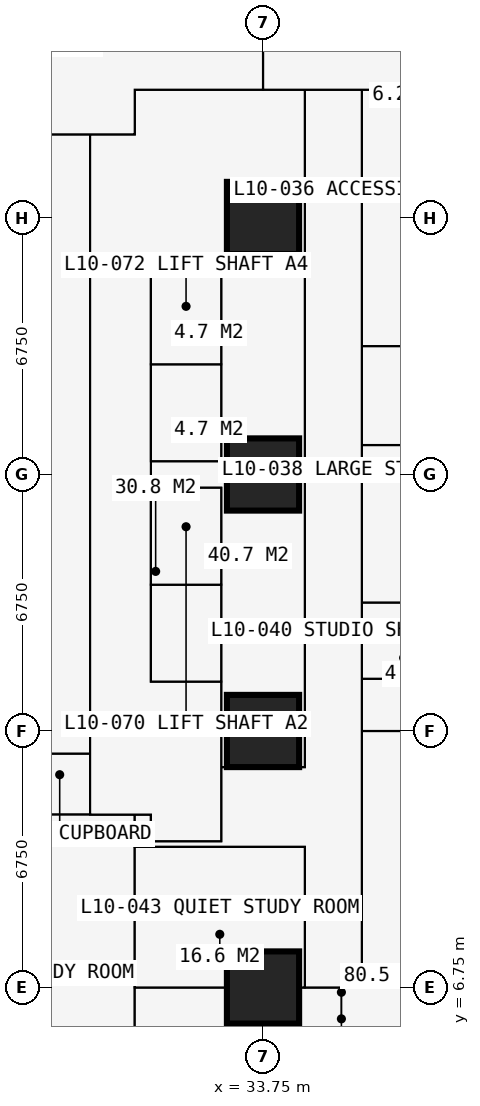
"""IFC4 building model, lengths in metres.
Left out: names, types, materials, properties, quantities, classifications, styles, units other than length and angle.
Written with IfcOpenShell. Run it as: python <this file> out.ifc"""

import sys

from ifc_helpers import new_model, si_unit, direction, frame, frame_2d, origin, origin_2d, place, context, subcontext, project, spatial, rectangle, extrude, element, fill, save


model = new_model("IFC4")
c1 = context("Model", 3, precision=1e-05, world=origin(), true_north=direction((0.0, 1.0)))
c2 = subcontext(c1, "Body", "Model", "MODEL_VIEW")
j1 = project(units=[si_unit("LENGTHUNIT", "METRE"), si_unit("PLANEANGLEUNIT", "RADIAN")], contexts=[c1])
p1 = place(None, origin())
s1 = spatial("IfcSite", under=j1, at=p1, CompositionType="ELEMENT")
p2 = place(p1, origin())
s2 = spatial("IfcBuilding", under=s1, at=p2, CompositionType="ELEMENT")
p3 = place(p2, frame((0.0, 0.0, 39.6)))
s3 = spatial("IfcBuildingStorey", under=s2, at=p3, CompositionType="ELEMENT", Elevation=39.6)
for number, where, z_axis, x_axis in (
    (1, (33.75, 6.75, 0.0), (0.0, 0.0, 1.0), (1.0, 0.0, 0.0)),
    (2, (33.75, 13.5, 0.0), (0.0, 0.0, 1.0), (1.0, 0.0, 0.0)),
    (3, (33.75, 20.25, 0.0), (0.0, 0.0, 1.0), (1.0, 0.0, 0.0)),
    (4, (33.75, 27.0, 0.0), (0.0, 0.0, 1.0), (1.0, 0.0, 0.0)),
):
    element("IfcColumn", number, at=place(p3, frame(where, z_axis=z_axis, x_axis=x_axis)), inside=s3, PredefinedType="COLUMN", context=c2, shape_type="SweptSolid", body=[
        extrude(rectangle(XDim=1.9, YDim=1.9, at=origin_2d()), origin(), (0.0, 0.0, 1.0), 3.6),
    ])
p4 = place(p3, frame((10.125, 11.3, 0.0), z_axis=(0.0, 0.0, 1.0), x_axis=(1.0, 0.0, 0.0)))
e5 = element("IfcWall", 5, at=p4, inside=s3, PredefinedType="PARTITIONING", context=c2, shape_type="SweptSolid", body=[
    extrude(rectangle(XDim=20.675, YDim=0.15, at=frame_2d((10.337, 0.0))), origin(), (0.0, 0.0, 1.0), 3.375),
])
p5 = place(p4, frame((8.375, 0.0, 0.0)))
e6 = element("IfcOpeningElement", 6, at=p5, cuts=e5, PredefinedType="OPENING", context=c2, shape_type="SweptSolid", body=[
    extrude(rectangle(XDim=1.0, YDim=2.2, at=frame_2d((0.5, 1.1))), frame((0.0, 0.085, 0.0), z_axis=(0.0, -1.0, 0.0), x_axis=(1.0, 0.0, 0.0)), (0.0, 0.0, 1.0), 0.17),
])
p6 = place(p4, frame((10.975, 0.0, 0.0)))
e7 = element("IfcOpeningElement", 7, at=p6, cuts=e5, PredefinedType="OPENING", context=c2, shape_type="SweptSolid", body=[
    extrude(rectangle(XDim=1.0, YDim=2.2, at=frame_2d((0.5, 1.1))), frame((0.0, 0.085, 0.0), z_axis=(0.0, -1.0, 0.0), x_axis=(1.0, 0.0, 0.0)), (0.0, 0.0, 1.0), 0.17),
])
p7 = place(p4, frame((3.925, 0.0, 0.0)))
e8 = element("IfcOpeningElement", 8, at=p7, cuts=e5, PredefinedType="OPENING", context=c2, shape_type="SweptSolid", body=[
    extrude(rectangle(XDim=0.95, YDim=2.2, at=frame_2d((0.475, 1.1))), frame((0.0, 0.085, 0.0), z_axis=(0.0, -1.0, 0.0), x_axis=(1.0, 0.0, 0.0)), (0.0, 0.0, 1.0), 0.17),
])
p8 = place(p3, frame((11.3, 29.2, 0.0), z_axis=(0.0, 0.0, 1.0), x_axis=(1.0, 0.0, 0.0)))
e9 = element("IfcWall", 9, at=p8, inside=s3, PredefinedType="PARTITIONING", context=c2, shape_type="SweptSolid", body=[
    extrude(rectangle(XDim=19.075, YDim=0.15, at=frame_2d((9.538, 0.0))), origin(), (0.0, 0.0, 1.0), 3.375),
])
p9 = place(p8, frame((10.137, 0.0, 0.0)))
e10 = element("IfcOpeningElement", 10, at=p9, cuts=e9, PredefinedType="OPENING", context=c2, shape_type="SweptSolid", body=[
    extrude(rectangle(XDim=1.0, YDim=2.2, at=frame_2d((0.5, 1.1))), frame((0.0, 0.085, 0.0), z_axis=(0.0, -1.0, 0.0), x_axis=(1.0, 0.0, 0.0)), (0.0, 0.0, 1.0), 0.17),
])
p10 = place(p3, frame((27.6, 12.9, 0.0), z_axis=(0.0, 0.0, 1.0), x_axis=(1.0, 0.0, 0.0)))
e11 = element("IfcWall", 11, at=p10, inside=s3, PredefinedType="PARTITIONING", context=c2, shape_type="SweptSolid", body=[
    extrude(rectangle(XDim=1.6, YDim=0.15, at=frame_2d((0.8, 0.0))), origin(), (0.0, 0.0, 1.0), 2.877),
])
p11 = place(p3, frame((29.2, 11.3, 0.0), z_axis=(0.0, 0.0, 1.0), x_axis=(0.0, 1.0, 0.0)))
e12 = element("IfcWall", 12, at=p11, inside=s3, PredefinedType="PARTITIONING", context=c2, shape_type="SweptSolid", body=[
    extrude(rectangle(XDim=17.9, YDim=0.2, at=frame_2d((8.95, 0.0))), origin(), (0.0, 0.0, 1.0), 3.375),
])
p12 = place(p11, frame((8.35, 0.0, 0.0)))
e13 = element("IfcOpeningElement", 13, at=p12, cuts=e12, PredefinedType="OPENING", context=c2, shape_type="SweptSolid", body=[
    extrude(rectangle(XDim=1.2, YDim=2.2, at=frame_2d((0.6, 1.1))), frame((0.0, 0.11, 0.0), z_axis=(0.0, -1.0, 0.0), x_axis=(1.0, 0.0, 0.0)), (0.0, 0.0, 1.0), 0.22),
])
p13 = place(p3, frame((29.2, 25.7, 0.0), z_axis=(0.0, 0.0, 1.0), x_axis=(1.0, 0.0, 0.0)))
e14 = element("IfcWall", 14, at=p13, inside=s3, PredefinedType="SHEAR", context=c2, shape_type="SweptSolid", body=[
    extrude(rectangle(XDim=3.45, YDim=0.1, at=frame_2d((1.725, 0.0))), origin(), (0.0, 0.0, 1.0), 3.375),
])
p14 = place(p3, frame((30.375, -0.734, 0.0), z_axis=(0.0, 0.0, 1.0), x_axis=(0.0, 1.0, 0.0)))
e15 = element("IfcWall", 15, at=p14, inside=s3, PredefinedType="PARTITIONING", context=c2, shape_type="SweptSolid", body=[
    extrude(rectangle(XDim=12.034, YDim=0.15, at=frame_2d((6.017, 0.0))), origin(), (0.0, 0.0, 1.0), 3.375),
])
p15 = place(p14, frame((5.134, 0.0, 0.0)))
e16 = element("IfcOpeningElement", 16, at=p15, cuts=e15, PredefinedType="OPENING", context=c2, shape_type="SweptSolid", body=[
    extrude(rectangle(XDim=1.0, YDim=2.2, at=frame_2d((0.5, 1.1))), frame((0.0, 0.085, 0.0), z_axis=(0.0, -1.0, 0.0), x_axis=(1.0, 0.0, 0.0)), (0.0, 0.0, 1.0), 0.17),
])
p16 = place(p3, frame((30.375, 6.75, 0.0), z_axis=(0.0, 0.0, 1.0), x_axis=(1.0, 0.0, 0.0)))
e17 = element("IfcWall", 17, at=p16, inside=s3, PredefinedType="PARTITIONING", context=c2, shape_type="SweptSolid", body=[
    extrude(rectangle(XDim=5.975, YDim=0.15, at=frame_2d((2.988, 0.0))), origin(), (0.0, 0.0, 1.0), 2.877),
])
p17 = place(p3, frame((30.375, 10.45, 0.0), z_axis=(0.0, 0.0, 1.0), x_axis=(1.0, 0.0, 0.0)))
e18 = element("IfcWall", 18, at=p17, inside=s3, PredefinedType="PARTITIONING", context=c2, shape_type="SweptSolid", body=[
    extrude(rectangle(XDim=4.475, YDim=0.15, at=frame_2d((2.238, 0.0))), origin(), (0.0, 0.0, 1.0), 3.375),
])
p18 = place(p17, frame((2.35, 0.0, 0.0)))
e19 = element("IfcOpeningElement", 19, at=p18, cuts=e18, PredefinedType="OPENING", context=c2, shape_type="SweptSolid", body=[
    extrude(rectangle(XDim=0.95, YDim=2.2, at=frame_2d((0.475, 1.1))), frame((0.0, 0.085, 0.0), z_axis=(0.0, -1.0, 0.0), x_axis=(1.0, 0.0, 0.0)), (0.0, 0.0, 1.0), 0.17),
])
p19 = place(p3, frame((30.375, 29.2, 0.0), z_axis=(0.0, 0.0, 1.0), x_axis=(0.0, 1.0, 0.0)))
e20 = element("IfcWall", 20, at=p19, inside=s3, PredefinedType="PARTITIONING", context=c2, shape_type="SweptSolid", body=[
    extrude(rectangle(XDim=1.175, YDim=0.15, at=frame_2d((0.587, 0.0))), origin(), (0.0, 0.0, 1.0), 3.375),
])
p20 = place(p3, frame((30.375, 30.375, 0.0), z_axis=(0.0, 0.0, 1.0), x_axis=(1.0, 0.0, 0.0)))
e21 = element("IfcWall", 21, at=p20, inside=s3, PredefinedType="PARTITIONING", context=c2, shape_type="SweptSolid", body=[
    extrude(rectangle(XDim=10.859, YDim=0.15, at=frame_2d((5.429, 0.0))), origin(), (0.0, 0.0, 1.0), 3.375),
])
p21 = place(p20, frame((4.725, 0.0, 0.0)))
e22 = element("IfcOpeningElement", 22, at=p21, cuts=e21, PredefinedType="OPENING", context=c2, shape_type="SweptSolid", body=[
    extrude(rectangle(XDim=1.0, YDim=2.2, at=frame_2d((0.5, 1.1))), frame((0.0, 0.085, 0.0), z_axis=(0.0, -1.0, 0.0), x_axis=(1.0, 0.0, 0.0)), (0.0, 0.0, 1.0), 0.17),
])
p22 = place(p3, frame((30.8, 10.6, 0.0), z_axis=(0.0, 0.0, 1.0), x_axis=(0.0, 1.0, 0.0)))
e23 = element("IfcWall", 23, at=p22, inside=s3, PredefinedType="PARTITIONING", context=c2, shape_type="SweptSolid", body=[
    extrude(rectangle(XDim=0.7, YDim=0.15, at=frame_2d((0.35, 0.0))), origin(), (0.0, 0.0, 1.0), 3.375),
])
p23 = place(p3, frame((30.8, 10.6, 0.0), z_axis=(0.0, 0.0, 1.0), x_axis=(1.0, 0.0, 0.0)))
e24 = element("IfcWall", 24, at=p23, inside=s3, PredefinedType="PARTITIONING", context=c2, shape_type="SweptSolid", body=[
    extrude(rectangle(XDim=1.85, YDim=0.15, at=frame_2d((0.925, 0.0))), origin(), (0.0, 0.0, 1.0), 3.375),
])
p24 = place(p3, frame((30.8, 14.8, 0.0), z_axis=(0.0, 0.0, 1.0), x_axis=(0.0, 1.0, 0.0)))
e25 = element("IfcWall", 25, at=p24, inside=s3, PredefinedType="PARTITIONING", context=c2, shape_type="SweptSolid", body=[
    extrude(rectangle(XDim=10.9, YDim=0.15, at=frame_2d((5.45, 0.0))), origin(), (0.0, 0.0, 1.0), 3.375),
])
p25 = place(p24, frame((0.75, 0.0, 0.0)))
e26 = element("IfcOpeningElement", 26, at=p25, cuts=e25, PredefinedType="OPENING", context=c2, shape_type="SweptSolid", body=[
    extrude(rectangle(XDim=1.1, YDim=2.2, at=frame_2d((0.55, 1.1))), frame((0.0, 0.085, 0.0), z_axis=(0.0, -1.0, 0.0), x_axis=(1.0, 0.0, 0.0)), (0.0, 0.0, 1.0), 0.17),
])
p26 = place(p24, frame((3.25, 0.0, 0.0)))
e27 = element("IfcOpeningElement", 27, at=p26, cuts=e25, PredefinedType="OPENING", context=c2, shape_type="SweptSolid", body=[
    extrude(rectangle(XDim=1.1, YDim=2.2, at=frame_2d((0.55, 1.1))), frame((0.0, 0.085, 0.0), z_axis=(0.0, -1.0, 0.0), x_axis=(1.0, 0.0, 0.0)), (0.0, 0.0, 1.0), 0.17),
])
p27 = place(p24, frame((6.5, 0.0, 0.0)))
e28 = element("IfcOpeningElement", 28, at=p27, cuts=e25, PredefinedType="OPENING", context=c2, shape_type="SweptSolid", body=[
    extrude(rectangle(XDim=1.1, YDim=2.2, at=frame_2d((0.55, 1.1))), frame((0.0, 0.085, 0.0), z_axis=(0.0, -1.0, 0.0), x_axis=(1.0, 0.0, 0.0)), (0.0, 0.0, 1.0), 0.17),
])
p28 = place(p24, frame((9.05, 0.0, 0.0)))
e29 = element("IfcOpeningElement", 29, at=p28, cuts=e25, PredefinedType="OPENING", context=c2, shape_type="SweptSolid", body=[
    extrude(rectangle(XDim=1.1, YDim=2.2, at=frame_2d((0.55, 1.1))), frame((0.0, 0.085, 0.0), z_axis=(0.0, -1.0, 0.0), x_axis=(1.0, 0.0, 0.0)), (0.0, 0.0, 1.0), 0.17),
])
for number, where, z_axis, x_axis in (
    (30, (30.8, 14.8, 0.0), (0.0, 0.0, 1.0), (1.0, 0.0, 0.0)),
    (31, (30.8, 17.35, 0.0), (0.0, 0.0, 1.0), (1.0, 0.0, 0.0)),
    (32, (30.8, 19.9, 0.0), (0.0, 0.0, 1.0), (1.0, 0.0, 0.0)),
    (33, (30.8, 20.6, 0.0), (0.0, 0.0, 1.0), (1.0, 0.0, 0.0)),
    (34, (30.8, 23.15, 0.0), (0.0, 0.0, 1.0), (1.0, 0.0, 0.0)),
):
    element("IfcWall", number, at=place(p3, frame(where, z_axis=z_axis, x_axis=x_axis)), inside=s3, PredefinedType="SHEAR", context=c2, shape_type="SweptSolid", body=[
        extrude(rectangle(XDim=1.85, YDim=0.1, at=frame_2d((0.925, 0.0))), origin(), (0.0, 0.0, 1.0), 3.375),
    ])
p29 = place(p3, frame((32.65, 10.6, 0.0), z_axis=(0.0, 0.0, 1.0), x_axis=(0.0, 1.0, 0.0)))
e35 = element("IfcWall", 35, at=p29, inside=s3, PredefinedType="SHEAR", context=c2, shape_type="SweptSolid", body=[
    extrude(rectangle(XDim=9.3, YDim=0.1, at=frame_2d((4.65, 0.0))), origin(), (0.0, 0.0, 1.0), 3.375),
])
p30 = place(p29, frame((0.5, 0.0, 0.0)))
e36 = element("IfcOpeningElement", 36, at=p30, cuts=e35, PredefinedType="OPENING", context=c2, shape_type="SweptSolid", body=[
    extrude(rectangle(XDim=1.0, YDim=2.2, at=frame_2d((0.5, 1.1))), frame((0.0, 0.06, 0.0), z_axis=(0.0, -1.0, 0.0), x_axis=(1.0, 0.0, 0.0)), (0.0, 0.0, 1.0), 0.12),
])
p31 = place(p3, frame((32.65, 12.55, 0.0), z_axis=(0.0, 0.0, 1.0), x_axis=(1.0, 0.0, 0.0)))
e37 = element("IfcWall", 37, at=p31, inside=s3, PredefinedType="PARTITIONING", context=c2, shape_type="SweptSolid", body=[
    extrude(rectangle(XDim=2.2, YDim=0.15, at=frame_2d((1.1, 0.0))), origin(), (0.0, 0.0, 1.0), 3.375),
])
p32 = place(p3, frame((32.65, 20.6, 0.0), z_axis=(0.0, 0.0, 1.0), x_axis=(0.0, 1.0, 0.0)))
e38 = element("IfcWall", 38, at=p32, inside=s3, PredefinedType="PARTITIONING", context=c2, shape_type="SweptSolid", body=[
    extrude(rectangle(XDim=5.1, YDim=0.15, at=frame_2d((2.55, 0.0))), origin(), (0.0, 0.0, 1.0), 3.375),
])
p33 = place(p3, frame((33.75, 30.375, 0.0), z_axis=(0.0, 0.0, 1.0), x_axis=(0.0, 1.0, 0.0)))
e39 = element("IfcWall", 39, at=p33, inside=s3, PredefinedType="PARTITIONING", context=c2, shape_type="SweptSolid", body=[
    extrude(rectangle(XDim=5.975, YDim=0.15, at=frame_2d((2.988, 0.0))), origin(), (0.0, 0.0, 1.0), 2.877),
])
p34 = place(p3, frame((34.85, 6.75, 0.0), z_axis=(0.0, 0.0, 1.0), x_axis=(0.0, 1.0, 0.0)))
e40 = element("IfcWall", 40, at=p34, inside=s3, PredefinedType="PARTITIONING", context=c2, shape_type="SweptSolid", body=[
    extrude(rectangle(XDim=3.7, YDim=0.15, at=frame_2d((1.85, 0.0))), origin(), (0.0, 0.0, 1.0), 3.375),
])
p35 = place(p3, frame((34.85, 12.55, 0.0), z_axis=(0.0, 0.0, 1.0), x_axis=(0.0, 1.0, 0.0)))
e41 = element("IfcWall", 41, at=p35, inside=s3, PredefinedType="PARTITIONING", context=c2, shape_type="SweptSolid", body=[
    extrude(rectangle(XDim=17.825, YDim=0.15, at=frame_2d((8.913, 0.0))), origin(), (0.0, 0.0, 1.0), 3.375),
])
p36 = place(p35, frame((8.65, 0.0, 0.0)))
e42 = element("IfcOpeningElement", 42, at=p36, cuts=e41, PredefinedType="OPENING", context=c2, shape_type="SweptSolid", body=[
    extrude(rectangle(XDim=0.95, YDim=2.2, at=frame_2d((0.475, 1.1))), frame((0.0, 0.085, 0.0), z_axis=(0.0, -1.0, 0.0), x_axis=(1.0, 0.0, 0.0)), (0.0, 0.0, 1.0), 0.17),
])
p37 = place(p3, frame((36.35, 6.75, 0.0), z_axis=(0.0, 0.0, 1.0), x_axis=(0.0, 1.0, 0.0)))
e43 = element("IfcWall", 43, at=p37, inside=s3, PredefinedType="PARTITIONING", context=c2, shape_type="SweptSolid", body=[
    extrude(rectangle(XDim=23.625, YDim=0.15, at=frame_2d((11.812, 0.0))), origin(), (0.0, 0.0, 1.0), 3.375),
])
p38 = place(p37, frame((18.475, 0.0, 0.0)))
e44 = element("IfcOpeningElement", 44, at=p38, cuts=e43, PredefinedType="OPENING", context=c2, shape_type="SweptSolid", body=[
    extrude(rectangle(XDim=0.95, YDim=2.2, at=frame_2d((0.475, 1.1))), frame((0.0, 0.085, 0.0), z_axis=(0.0, -1.0, 0.0), x_axis=(1.0, 0.0, 0.0)), (0.0, 0.0, 1.0), 0.17),
])
p39 = place(p37, frame((11.725, 0.0, 0.0)))
e45 = element("IfcOpeningElement", 45, at=p39, cuts=e43, PredefinedType="OPENING", context=c2, shape_type="SweptSolid", body=[
    extrude(rectangle(XDim=0.95, YDim=2.2, at=frame_2d((0.475, 1.1))), frame((0.0, 0.085, 0.0), z_axis=(0.0, -1.0, 0.0), x_axis=(1.0, 0.0, 0.0)), (0.0, 0.0, 1.0), 0.17),
])
p40 = place(p37, frame((6.95, 0.0, 0.0)))
e46 = element("IfcOpeningElement", 46, at=p40, cuts=e43, PredefinedType="OPENING", context=c2, shape_type="SweptSolid", body=[
    extrude(rectangle(XDim=0.95, YDim=2.2, at=frame_2d((0.475, 1.1))), frame((0.0, 0.085, 0.0), z_axis=(0.0, -1.0, 0.0), x_axis=(1.0, 0.0, 0.0)), (0.0, 0.0, 1.0), 0.17),
])
p41 = place(p3, frame((36.35, 13.5, 0.0), z_axis=(0.0, 0.0, 1.0), x_axis=(1.0, 0.0, 0.0)))
e47 = element("IfcWall", 47, at=p41, inside=s3, PredefinedType="PARTITIONING", context=c2, shape_type="SweptSolid", body=[
    extrude(rectangle(XDim=4.884, YDim=0.15, at=frame_2d((2.442, 0.0))), origin(), (0.0, 0.0, 1.0), 2.877),
])
p42 = place(p3, frame((36.35, 14.875, 0.0), z_axis=(0.0, 0.0, 1.0), x_axis=(1.0, 0.0, 0.0)))
e48 = element("IfcWall", 48, at=p42, inside=s3, PredefinedType="PARTITIONING", context=c2, shape_type="SweptSolid", body=[
    extrude(rectangle(XDim=2.2, YDim=0.1, at=frame_2d((1.1, 0.0))), origin(), (0.0, 0.0, 1.0), 3.375),
])
p43 = place(p3, frame((36.35, 16.875, 0.0), z_axis=(0.0, 0.0, 1.0), x_axis=(1.0, 0.0, 0.0)))
e49 = element("IfcWall", 49, at=p43, inside=s3, PredefinedType="PARTITIONING", context=c2, shape_type="SweptSolid", body=[
    extrude(rectangle(XDim=4.884, YDim=0.175, at=frame_2d((2.442, 0.0))), origin(), (0.0, 0.0, 1.0), 3.375),
])
p44 = place(p43, frame((0.65, 0.0, 0.0)))
e50 = element("IfcOpeningElement", 50, at=p44, cuts=e49, PredefinedType="OPENING", context=c2, shape_type="SweptSolid", body=[
    extrude(rectangle(XDim=0.9, YDim=2.2, at=frame_2d((0.45, 1.1))), frame((0.0, 0.097, 0.0), z_axis=(0.0, -1.0, 0.0), x_axis=(1.0, 0.0, 0.0)), (0.0, 0.0, 1.0), 0.195),
])
p45 = place(p3, frame((36.35, 21.025, 0.0), z_axis=(0.0, 0.0, 1.0), x_axis=(1.0, 0.0, 0.0)))
e51 = element("IfcWall", 51, at=p45, inside=s3, PredefinedType="PARTITIONING", context=c2, shape_type="SweptSolid", body=[
    extrude(rectangle(XDim=2.4, YDim=0.1, at=frame_2d((1.2, 0.0))), origin(), (0.0, 0.0, 1.0), 3.375),
])
p46 = place(p3, frame((36.35, 23.625, 0.0), z_axis=(0.0, 0.0, 1.0), x_axis=(1.0, 0.0, 0.0)))
e52 = element("IfcWall", 52, at=p46, inside=s3, PredefinedType="PARTITIONING", context=c2, shape_type="SweptSolid", body=[
    extrude(rectangle(XDim=4.884, YDim=0.175, at=frame_2d((2.442, 0.0))), origin(), (0.0, 0.0, 1.0), 3.375),
])
p47 = place(p46, frame((0.75, 0.0, 0.0)))
e53 = element("IfcOpeningElement", 53, at=p47, cuts=e52, PredefinedType="OPENING", context=c2, shape_type="SweptSolid", body=[
    extrude(rectangle(XDim=0.9, YDim=2.2, at=frame_2d((0.45, 1.1))), frame((0.0, 0.097, 0.0), z_axis=(0.0, -1.0, 0.0), x_axis=(1.0, 0.0, 0.0)), (0.0, 0.0, 1.0), 0.195),
])
p48 = place(p3, frame((36.35, 27.775, 0.0), z_axis=(0.0, 0.0, 1.0), x_axis=(1.0, 0.0, 0.0)))
e54 = element("IfcWall", 54, at=p48, inside=s3, PredefinedType="PARTITIONING", context=c2, shape_type="SweptSolid", body=[
    extrude(rectangle(XDim=2.4, YDim=0.1, at=frame_2d((1.2, 0.0))), origin(), (0.0, 0.0, 1.0), 3.375),
])
p49 = place(p38, origin())
e55 = element("IfcDoor", 55, at=p49, inside=s3, OperationType="SINGLE_SWING_LEFT", PredefinedType="DOOR", context=c2, shape_type="SweptSolid", body=[
    extrude(rectangle(XDim=0.95, YDim=2.2, at=frame_2d((0.475, 1.1))), frame((0.0, 0.025, 0.0), z_axis=(0.0, -1.0, 0.0), x_axis=(1.0, 0.0, 0.0)), (0.0, 0.0, 1.0), 0.05),
])
fill(e44, e55)
p50 = place(p39, origin())
e56 = element("IfcDoor", 56, at=p50, inside=s3, OperationType="SINGLE_SWING_LEFT", PredefinedType="DOOR", context=c2, shape_type="SweptSolid", body=[
    extrude(rectangle(XDim=0.95, YDim=2.2, at=frame_2d((0.475, 1.1))), frame((0.0, 0.025, 0.0), z_axis=(0.0, -1.0, 0.0), x_axis=(1.0, 0.0, 0.0)), (0.0, 0.0, 1.0), 0.05),
])
fill(e45, e56)
p51 = place(p47, origin())
e57 = element("IfcDoor", 57, at=p51, inside=s3, OperationType="SINGLE_SWING_RIGHT", PredefinedType="DOOR", context=c2, shape_type="SweptSolid", body=[
    extrude(rectangle(XDim=0.9, YDim=2.2, at=frame_2d((0.45, 1.1))), frame((0.0, 0.025, 0.0), z_axis=(0.0, -1.0, 0.0), x_axis=(1.0, 0.0, 0.0)), (0.0, 0.0, 1.0), 0.05),
])
fill(e53, e57)
p52 = place(p40, origin())
e58 = element("IfcDoor", 58, at=p52, inside=s3, OperationType="SINGLE_SWING_LEFT", PredefinedType="DOOR", context=c2, shape_type="SweptSolid", body=[
    extrude(rectangle(XDim=0.95, YDim=2.2, at=frame_2d((0.475, 1.1))), frame((0.0, 0.025, 0.0), z_axis=(0.0, -1.0, 0.0), x_axis=(1.0, 0.0, 0.0)), (0.0, 0.0, 1.0), 0.05),
])
fill(e46, e58)
p53 = place(p44, origin())
e59 = element("IfcDoor", 59, at=p53, inside=s3, OperationType="SINGLE_SWING_RIGHT", PredefinedType="DOOR", context=c2, shape_type="SweptSolid", body=[
    extrude(rectangle(XDim=0.9, YDim=2.2, at=frame_2d((0.45, 1.1))), frame((0.0, 0.025, 0.0), z_axis=(0.0, -1.0, 0.0), x_axis=(1.0, 0.0, 0.0)), (0.0, 0.0, 1.0), 0.05),
])
fill(e50, e59)
p54 = place(p30, origin())
e60 = element("IfcDoor", 60, at=p54, inside=s3, OperationType="SINGLE_SWING_LEFT", PredefinedType="DOOR", context=c2, shape_type="SweptSolid", body=[
    extrude(rectangle(XDim=1.0, YDim=2.2, at=frame_2d((0.5, 1.1))), frame((0.0, 0.025, 0.0), z_axis=(0.0, -1.0, 0.0), x_axis=(1.0, 0.0, 0.0)), (0.0, 0.0, 1.0), 0.05),
])
fill(e36, e60)
p55 = place(p36, origin())
e61 = element("IfcDoor", 61, at=p55, inside=s3, OperationType="SINGLE_SWING_LEFT", PredefinedType="DOOR", context=c2, shape_type="SweptSolid", body=[
    extrude(rectangle(XDim=0.95, YDim=2.2, at=frame_2d((0.475, 1.1))), frame((0.0, 0.025, 0.0), z_axis=(0.0, -1.0, 0.0), x_axis=(1.0, 0.0, 0.0)), (0.0, 0.0, 1.0), 0.05),
])
fill(e42, e61)
p56 = place(p18, origin())
e62 = element("IfcDoor", 62, at=p56, inside=s3, OperationType="SINGLE_SWING_LEFT", PredefinedType="DOOR", context=c2, shape_type="SweptSolid", body=[
    extrude(rectangle(XDim=0.95, YDim=2.2, at=frame_2d((0.475, 1.1))), frame((0.0, 0.025, 0.0), z_axis=(0.0, -1.0, 0.0), x_axis=(1.0, 0.0, 0.0)), (0.0, 0.0, 1.0), 0.05),
])
fill(e19, e62)
p57 = place(p21, origin())
e63 = element("IfcDoor", 63, at=p57, inside=s3, OperationType="SINGLE_SWING_LEFT", PredefinedType="DOOR", context=c2, shape_type="SweptSolid", body=[
    extrude(rectangle(XDim=1.0, YDim=2.2, at=frame_2d((0.5, 1.1))), frame((0.0, 0.025, 0.0), z_axis=(0.0, -1.0, 0.0), x_axis=(1.0, 0.0, 0.0)), (0.0, 0.0, 1.0), 0.05),
])
fill(e22, e63)
p58 = place(p25, origin())
e64 = element("IfcDoor", 64, at=p58, inside=s3, OperationType="DOUBLE_DOOR_SLIDING", PredefinedType="DOOR", context=c2, shape_type="SweptSolid", body=[
    extrude(rectangle(XDim=1.1, YDim=2.2, at=frame_2d((0.55, 1.1))), frame((0.0, 0.025, 0.0), z_axis=(0.0, -1.0, 0.0), x_axis=(1.0, 0.0, 0.0)), (0.0, 0.0, 1.0), 0.05),
])
fill(e26, e64)
p59 = place(p26, origin())
e65 = element("IfcDoor", 65, at=p59, inside=s3, OperationType="DOUBLE_DOOR_SLIDING", PredefinedType="DOOR", context=c2, shape_type="SweptSolid", body=[
    extrude(rectangle(XDim=1.1, YDim=2.2, at=frame_2d((0.55, 1.1))), frame((0.0, 0.025, 0.0), z_axis=(0.0, -1.0, 0.0), x_axis=(1.0, 0.0, 0.0)), (0.0, 0.0, 1.0), 0.05),
])
fill(e27, e65)
p60 = place(p27, origin())
e66 = element("IfcDoor", 66, at=p60, inside=s3, OperationType="DOUBLE_DOOR_SLIDING", PredefinedType="DOOR", context=c2, shape_type="SweptSolid", body=[
    extrude(rectangle(XDim=1.1, YDim=2.2, at=frame_2d((0.55, 1.1))), frame((0.0, 0.025, 0.0), z_axis=(0.0, -1.0, 0.0), x_axis=(1.0, 0.0, 0.0)), (0.0, 0.0, 1.0), 0.05),
])
fill(e28, e66)
p61 = place(p28, origin())
e67 = element("IfcDoor", 67, at=p61, inside=s3, OperationType="DOUBLE_DOOR_SLIDING", PredefinedType="DOOR", context=c2, shape_type="SweptSolid", body=[
    extrude(rectangle(XDim=1.1, YDim=2.2, at=frame_2d((0.55, 1.1))), frame((0.0, 0.025, 0.0), z_axis=(0.0, -1.0, 0.0), x_axis=(1.0, 0.0, 0.0)), (0.0, 0.0, 1.0), 0.05),
])
fill(e29, e67)
p62 = place(p12, origin())
e68 = element("IfcDoor", 68, at=p62, inside=s3, OperationType="DOUBLE_DOOR_SINGLE_SWING", PredefinedType="DOOR", context=c2, shape_type="SweptSolid", body=[
    extrude(rectangle(XDim=1.2, YDim=2.2, at=frame_2d((0.6, 1.1))), frame((0.0, 0.025, 0.0), z_axis=(0.0, -1.0, 0.0), x_axis=(1.0, 0.0, 0.0)), (0.0, 0.0, 1.0), 0.05),
])
fill(e13, e68)
save(model, sys.argv[1])
